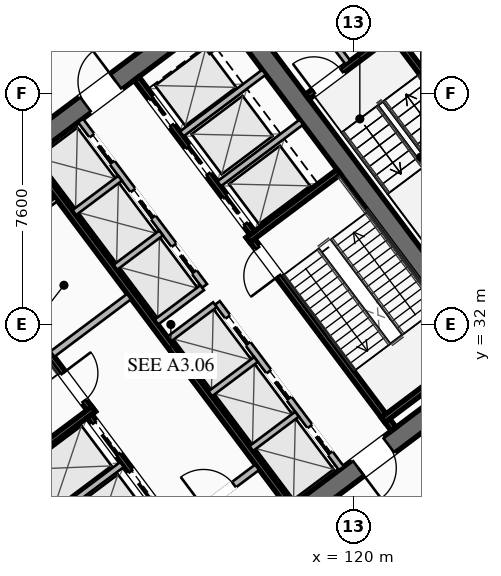
"""IFC4 building model, lengths in metres.
Left out: names, types, materials, properties, quantities, classifications, styles, units other than length and angle.
Written with IfcOpenShell. Run it as: python <this file> out.ifc"""

import sys

from ifc_helpers import new_model, si_unit, direction, frame, frame_2d, origin, place, context, subcontext, project, spatial, rectangle, extrude, element, fill, save


model = new_model("IFC4")
c1 = context("Model", 3, precision=1e-05, world=origin(), true_north=direction((0.0, 1.0)))
c2 = subcontext(c1, "Body", "Model", "MODEL_VIEW")
j1 = project(units=[si_unit("LENGTHUNIT", "METRE"), si_unit("PLANEANGLEUNIT", "RADIAN")], contexts=[c1])
p1 = place(None, origin())
s1 = spatial("IfcSite", under=j1, at=p1, CompositionType="ELEMENT")
p2 = place(p1, origin())
s2 = spatial("IfcBuilding", under=s1, at=p2, CompositionType="ELEMENT")
p3 = place(p2, origin())
s3 = spatial("IfcBuildingStorey", under=s2, at=p3, CompositionType="ELEMENT", Elevation=0.0)
for number, where, z_axis, x_axis in (
    (1, (112.476, 21.107, 0.0), (0.0, 0.0, 1.0), (-0.6, 0.8, 0.0)),
    (2, (115.524, 42.893, 0.0), (0.0, 0.0, 1.0), (0.6, -0.8, 0.0)),
):
    element("IfcWall", number, at=place(p3, frame(where, z_axis=z_axis, x_axis=x_axis)), inside=s3, PredefinedType="SHEAR", context=c2, shape_type="SweptSolid", body=[
        extrude(rectangle(XDim=15.6, YDim=0.65, at=frame_2d((7.8, 0.0))), origin(), (0.0, 0.0, 1.0), 5.4),
    ])
p4 = place(p3, frame((124.429, 30.478, 0.0), z_axis=(0.0, 0.0, 1.0), x_axis=(-0.799998028465, -0.600002628705, 0.0)))
e3 = element("IfcWall", 3, at=p4, inside=s3, PredefinedType="SHEAR", context=c2, shape_type="SweptSolid", body=[
    extrude(rectangle(XDim=14.86, YDim=0.65, at=frame_2d((7.43, 0.0))), origin(), (0.0, 0.0, 1.0), 5.4),
])
p5 = place(p4, frame((9.13, 0.0, 0.0)))
e4 = element("IfcOpeningElement", 4, at=p5, cuts=e3, PredefinedType="OPENING", context=c2, shape_type="SweptSolid", body=[
    extrude(rectangle(XDim=1.25, YDim=2.25, at=frame_2d((0.625, 1.125))), frame((0.0, 0.335, 0.0), z_axis=(0.0, -1.0, 0.0), x_axis=(1.0, 0.0, 0.0)), (0.0, 0.0, 1.0), 0.67),
])
p6 = place(p4, frame((4.08, 0.0, 0.0)))
e5 = element("IfcOpeningElement", 5, at=p6, cuts=e3, PredefinedType="OPENING", context=c2, shape_type="SweptSolid", body=[
    extrude(rectangle(XDim=1.25, YDim=2.25, at=frame_2d((0.625, 1.125))), frame((0.0, 0.335, 0.0), z_axis=(0.0, -1.0, 0.0), x_axis=(1.0, 0.0, 0.0)), (0.0, 0.0, 1.0), 0.67),
])
p7 = place(p3, frame((103.571, 33.522, 0.0), z_axis=(0.0, 0.0, 1.0), x_axis=(0.799998028465, 0.600002628705, 0.0)))
e6 = element("IfcWall", 6, at=p7, inside=s3, PredefinedType="SHEAR", context=c2, shape_type="SweptSolid", body=[
    extrude(rectangle(XDim=14.86, YDim=0.65, at=frame_2d((7.43, 0.0))), origin(), (0.0, 0.0, 1.0), 5.4),
])
p8 = place(p7, frame((4.48, 0.0, 0.0)))
e7 = element("IfcOpeningElement", 7, at=p8, cuts=e6, PredefinedType="OPENING", context=c2, shape_type="SweptSolid", body=[
    extrude(rectangle(XDim=1.25, YDim=2.25, at=frame_2d((0.625, 1.125))), frame((0.0, 0.335, 0.0), z_axis=(0.0, -1.0, 0.0), x_axis=(1.0, 0.0, 0.0)), (0.0, 0.0, 1.0), 0.67),
])
p9 = place(p7, frame((9.53, 0.0, 0.0)))
e8 = element("IfcOpeningElement", 8, at=p9, cuts=e6, PredefinedType="OPENING", context=c2, shape_type="SweptSolid", body=[
    extrude(rectangle(XDim=1.25, YDim=2.25, at=frame_2d((0.625, 1.125))), frame((0.0, 0.335, 0.0), z_axis=(0.0, -1.0, 0.0), x_axis=(1.0, 0.0, 0.0)), (0.0, 0.0, 1.0), 0.67),
])
p10 = place(p3, frame((106.67, 35.44, 0.0), z_axis=(0.0, 0.0, 1.0), x_axis=(0.600009827119, -0.799992629566, 0.0)))
e9 = element("IfcWall", 9, at=p10, inside=s3, PredefinedType="SHEAR", context=c2, shape_type="SweptSolid", body=[
    extrude(rectangle(XDim=7.95, YDim=0.2, at=frame_2d((3.975, 0.0))), origin(), (0.0, 0.0, 1.0), 5.14),
])
p11 = place(p10, frame((6.3, 0.0, 0.0)))
e10 = element("IfcOpeningElement", 10, at=p11, cuts=e9, PredefinedType="OPENING", context=c2, shape_type="SweptSolid", body=[
    extrude(rectangle(XDim=1.15, YDim=2.2, at=frame_2d((0.575, 1.1))), frame((0.0, 0.11, 0.0), z_axis=(0.0, -1.0, 0.0), x_axis=(1.0, 0.0, 0.0)), (0.0, 0.0, 1.0), 0.22),
])
p12 = place(p3, frame((108.476, 26.982, 0.0), z_axis=(0.0, 0.0, 1.0), x_axis=(0.799984290658, 0.600020945218, 0.0)))
e11 = element("IfcWall", 11, at=p12, inside=s3, PredefinedType="SHEAR", context=c2, shape_type="SweptSolid", body=[
    extrude(rectangle(XDim=3.73, YDim=0.2, at=frame_2d((1.865, 0.0))), origin(), (0.0, 0.0, 1.0), 5.14),
])
p13 = place(p3, frame((121.33, 28.56, 0.0), z_axis=(0.0, 0.0, 1.0), x_axis=(-0.600009827119, 0.799992629566, 0.0)))
e12 = element("IfcWall", 12, at=p13, inside=s3, PredefinedType="SHEAR", context=c2, shape_type="SweptSolid", body=[
    extrude(rectangle(XDim=7.95, YDim=0.2, at=frame_2d((3.975, 0.0))), origin(), (0.0, 0.0, 1.0), 5.14),
])
p14 = place(p13, frame((6.3, 0.0, 0.0)))
e13 = element("IfcOpeningElement", 13, at=p14, cuts=e12, PredefinedType="OPENING", context=c2, shape_type="SweptSolid", body=[
    extrude(rectangle(XDim=1.15, YDim=2.2, at=frame_2d((0.575, 1.1))), frame((0.0, 0.11, 0.0), z_axis=(0.0, -1.0, 0.0), x_axis=(1.0, 0.0, 0.0)), (0.0, 0.0, 1.0), 0.22),
])
for number, where, z_axis, x_axis in (
    (14, (116.54, 34.78, 0.0), (0.0, 0.0, 1.0), (0.8, 0.6, 0.0)),
    (15, (120.98, 28.86, 0.0), (0.0, 0.0, 1.0), (0.8, 0.6, 0.0)),
):
    element("IfcWall", number, at=place(p3, frame(where, z_axis=z_axis, x_axis=x_axis)), inside=s3, PredefinedType="SHEAR", context=c2, shape_type="SweptSolid", body=[
        extrude(rectangle(XDim=3.73, YDim=0.2, at=frame_2d((1.865, 0.0))), origin(), (0.0, 0.0, 1.0), 5.14),
    ])
p15 = place(p3, frame((117.938, 26.016, 0.0), z_axis=(0.0, 0.0, 1.0), x_axis=(-0.600005463273, 0.799995902516, 0.0)))
e16 = element("IfcWall", 16, at=p15, inside=s3, PredefinedType="SHEAR", context=c2, shape_type="SweptSolid", body=[
    extrude(rectangle(XDim=14.3, YDim=0.2, at=frame_2d((7.15, 0.0))), origin(), (0.0, 0.0, 1.0), 5.14),
])
p16 = place(p3, frame((110.104, 31.028, 0.0), z_axis=(0.0, 0.0, 1.0), x_axis=(0.800018601094, 0.59997519774, 0.0)))
e17 = element("IfcWall", 17, at=p16, inside=s3, PredefinedType="SOLIDWALL", context=c2, shape_type="SweptSolid", body=[
    extrude(rectangle(XDim=3.15, YDim=0.22, at=frame_2d((1.575, 0.0))), origin(), (0.0, 0.0, 1.0), 3.31),
])
p17 = place(p3, frame((114.316, 25.412, 0.0), z_axis=(0.0, 0.0, 1.0), x_axis=(0.800018601094, 0.59997519774, 0.0)))
e18 = element("IfcWall", 18, at=p17, inside=s3, PredefinedType="SOLIDWALL", context=c2, shape_type="SweptSolid", body=[
    extrude(rectangle(XDim=3.15, YDim=0.22, at=frame_2d((1.575, 0.0))), origin(), (0.0, 0.0, 1.0), 3.31),
])
p18 = place(p17, frame((0.95, 0.0, 0.0)))
e19 = element("IfcOpeningElement", 19, at=p18, cuts=e18, PredefinedType="OPENING", context=c2, shape_type="SweptSolid", body=[
    extrude(rectangle(XDim=1.25, YDim=2.25, at=frame_2d((0.625, 1.125))), frame((0.0, 0.12, 0.0), z_axis=(0.0, -1.0, 0.0), x_axis=(1.0, 0.0, 0.0)), (0.0, 0.0, 1.0), 0.24),
])
p19 = place(p3, frame((115.13, 23.91, 0.0), z_axis=(0.0, 0.0, 1.0), x_axis=(-0.599975393228, 0.800018454488, 0.0)))
e20 = element("IfcWall", 20, at=p19, inside=s3, PredefinedType="SHEAR", context=c2, shape_type="SweptSolid", body=[
    extrude(rectangle(XDim=6.35, YDim=0.2, at=frame_2d((3.175, 0.0))), origin(), (0.0, 0.0, 1.0), 5.14),
])
p20 = place(p19, frame((4.775, 0.0, 0.0)))
e21 = element("IfcOpeningElement", 21, at=p20, cuts=e20, PredefinedType="OPENING", context=c2, shape_type="SweptSolid", body=[
    extrude(rectangle(XDim=1.3, YDim=2.25, at=frame_2d((0.65, 1.125))), frame((0.0, 0.11, 0.0), z_axis=(0.0, -1.0, 0.0), x_axis=(1.0, 0.0, 0.0)), (0.0, 0.0, 1.0), 0.22),
])
p21 = place(p19, frame((2.775, 0.0, 0.0)))
e22 = element("IfcOpeningElement", 22, at=p21, cuts=e20, PredefinedType="OPENING", context=c2, shape_type="SweptSolid", body=[
    extrude(rectangle(XDim=1.3, YDim=2.25, at=frame_2d((0.65, 1.125))), frame((0.0, 0.11, 0.0), z_axis=(0.0, -1.0, 0.0), x_axis=(1.0, 0.0, 0.0)), (0.0, 0.0, 1.0), 0.22),
])
p22 = place(p19, frame((0.575, 0.0, 0.0)))
e23 = element("IfcOpeningElement", 23, at=p22, cuts=e20, PredefinedType="OPENING", context=c2, shape_type="SweptSolid", body=[
    extrude(rectangle(XDim=1.3, YDim=2.25, at=frame_2d((0.65, 1.125))), frame((0.0, 0.11, 0.0), z_axis=(0.0, -1.0, 0.0), x_axis=(1.0, 0.0, 0.0)), (0.0, 0.0, 1.0), 0.22),
])
p23 = place(p3, frame((109.688, 25.366, 0.0), z_axis=(0.0, 0.0, 1.0), x_axis=(0.8, 0.6, 0.0)))
e24 = element("IfcWall", 24, at=p23, inside=s3, PredefinedType="SOLIDWALL", context=c2, shape_type="SweptSolid", body=[
    extrude(rectangle(XDim=3.38, YDim=0.2, at=frame_2d((1.69, 0.0))), origin(), (0.0, 0.0, 1.0), 5.14),
])
p24 = place(p3, frame((112.87, 40.09, 0.0), z_axis=(0.0, 0.0, 1.0), x_axis=(0.599975393228, -0.800018454488, 0.0)))
e25 = element("IfcWall", 25, at=p24, inside=s3, PredefinedType="SHEAR", context=c2, shape_type="SweptSolid", body=[
    extrude(rectangle(XDim=6.35, YDim=0.2, at=frame_2d((3.175, 0.0))), origin(), (0.0, 0.0, 1.0), 5.14),
])
p25 = place(p24, frame((4.875, 0.0, 0.0)))
e26 = element("IfcOpeningElement", 26, at=p25, cuts=e25, PredefinedType="OPENING", context=c2, shape_type="SweptSolid", body=[
    extrude(rectangle(XDim=1.1, YDim=2.2, at=frame_2d((0.55, 1.1))), frame((0.0, 0.11, 0.0), z_axis=(0.0, -1.0, 0.0), x_axis=(1.0, 0.0, 0.0)), (0.0, 0.0, 1.0), 0.22),
])
p26 = place(p24, frame((2.825, 0.0, 0.0)))
e27 = element("IfcOpeningElement", 27, at=p26, cuts=e25, PredefinedType="OPENING", context=c2, shape_type="SweptSolid", body=[
    extrude(rectangle(XDim=1.1, YDim=2.2, at=frame_2d((0.55, 1.1))), frame((0.0, 0.11, 0.0), z_axis=(0.0, -1.0, 0.0), x_axis=(1.0, 0.0, 0.0)), (0.0, 0.0, 1.0), 0.22),
])
p27 = place(p24, frame((0.825, 0.0, 0.0)))
e28 = element("IfcOpeningElement", 28, at=p27, cuts=e25, PredefinedType="OPENING", context=c2, shape_type="SweptSolid", body=[
    extrude(rectangle(XDim=1.1, YDim=2.2, at=frame_2d((0.55, 1.1))), frame((0.0, 0.11, 0.0), z_axis=(0.0, -1.0, 0.0), x_axis=(1.0, 0.0, 0.0)), (0.0, 0.0, 1.0), 0.22),
])
for number, where, z_axis, x_axis in (
    (29, (115.59, 36.63, 0.0), (0.0, 0.0, 1.0), (0.8, 0.6, 0.0)),
    (30, (114.36, 38.27, 0.0), (0.0, 0.0, 1.0), (0.8, 0.6, 0.0)),
):
    element("IfcWall", number, at=place(p3, frame(where, z_axis=z_axis, x_axis=x_axis)), inside=s3, PredefinedType="SOLIDWALL", context=c2, shape_type="SweptSolid", body=[
        extrude(rectangle(XDim=3.38, YDim=0.2, at=frame_2d((1.69, 0.0))), origin(), (0.0, 0.0, 1.0), 5.14),
    ])
p28 = place(p3, frame((107.71, 34.22, 0.0), z_axis=(0.0, 0.0, 1.0), x_axis=(0.799981399002, 0.60002480053, 0.0)))
e31 = element("IfcWall", 31, at=p28, inside=s3, PredefinedType="PARTITIONING", context=c2, shape_type="SweptSolid", body=[
    extrude(rectangle(XDim=3.15, YDim=0.135, at=frame_2d((1.575, 0.0))), origin(), (0.0, 0.0, 1.0), 3.31),
])
p29 = place(p28, frame((1.05, 0.0, 0.0)))
e32 = element("IfcOpeningElement", 32, at=p29, cuts=e31, PredefinedType="OPENING", context=c2, shape_type="SweptSolid", body=[
    extrude(rectangle(XDim=1.05, YDim=2.2, at=frame_2d((0.525, 1.1))), frame((0.0, 0.077, 0.0), z_axis=(0.0, -1.0, 0.0), x_axis=(1.0, 0.0, 0.0)), (0.0, 0.0, 1.0), 0.155),
])
p30 = place(p3, frame((119.61, 27.27, 0.0), z_axis=(0.0, 0.0, 1.0), x_axis=(-0.600011488909, 0.79999138319, 0.0)))
e33 = element("IfcWall", 33, at=p30, inside=s3, PredefinedType="SOLIDWALL", context=c2, shape_type="SweptSolid", body=[
    extrude(rectangle(XDim=6.8, YDim=0.2, at=frame_2d((3.4, 0.0))), origin(), (0.0, 0.0, 1.0), 5.14),
])
p31 = place(p30, frame((0.625, 0.0, 0.0)))
e34 = element("IfcOpeningElement", 34, at=p31, cuts=e33, PredefinedType="OPENING", context=c2, shape_type="SweptSolid", body=[
    extrude(rectangle(XDim=1.1, YDim=2.2, at=frame_2d((0.55, 1.1))), frame((0.0, 0.11, 0.0), z_axis=(0.0, -1.0, 0.0), x_axis=(1.0, 0.0, 0.0)), (0.0, 0.0, 1.0), 0.22),
])
p32 = place(p30, frame((2.875, 0.0, 0.0)))
e35 = element("IfcOpeningElement", 35, at=p32, cuts=e33, PredefinedType="OPENING", context=c2, shape_type="SweptSolid", body=[
    extrude(rectangle(XDim=1.1, YDim=2.2, at=frame_2d((0.55, 1.1))), frame((0.0, 0.11, 0.0), z_axis=(0.0, -1.0, 0.0), x_axis=(1.0, 0.0, 0.0)), (0.0, 0.0, 1.0), 0.22),
])
p33 = place(p30, frame((5.125, 0.0, 0.0)))
e36 = element("IfcOpeningElement", 36, at=p33, cuts=e33, PredefinedType="OPENING", context=c2, shape_type="SweptSolid", body=[
    extrude(rectangle(XDim=1.1, YDim=2.2, at=frame_2d((0.55, 1.1))), frame((0.0, 0.11, 0.0), z_axis=(0.0, -1.0, 0.0), x_axis=(1.0, 0.0, 0.0)), (0.0, 0.0, 1.0), 0.22),
])
p34 = place(p3, frame((116.646, 27.922, 0.0), z_axis=(0.0, 0.0, 1.0), x_axis=(0.8, 0.6, 0.0)))
e37 = element("IfcWall", 37, at=p34, inside=s3, PredefinedType="SOLIDWALL", context=c2, shape_type="SweptSolid", body=[
    extrude(rectangle(XDim=1.88, YDim=0.2, at=frame_2d((0.94, 0.0))), origin(), (0.0, 0.0, 1.0), 5.14),
])
p35 = place(p3, frame((115.296, 29.722, 0.0), z_axis=(0.0, 0.0, 1.0), x_axis=(0.799984418148, 0.600020775241, 0.0)))
e38 = element("IfcWall", 38, at=p35, inside=s3, PredefinedType="SOLIDWALL", context=c2, shape_type="SweptSolid", body=[
    extrude(rectangle(XDim=1.88, YDim=0.2, at=frame_2d((0.94, 0.0))), origin(), (0.0, 0.0, 1.0), 5.14),
])
p36 = place(p3, frame((113.946, 31.522, 0.0), z_axis=(0.0, 0.0, 1.0), x_axis=(0.8, 0.6, 0.0)))
e39 = element("IfcWall", 39, at=p36, inside=s3, PredefinedType="SOLIDWALL", context=c2, shape_type="SweptSolid", body=[
    extrude(rectangle(XDim=1.88, YDim=0.2, at=frame_2d((0.94, 0.0))), origin(), (0.0, 0.0, 1.0), 5.14),
])
p37 = place(p3, frame((115.11, 33.27, 0.0), z_axis=(0.0, 0.0, 1.0), x_axis=(-0.600011488909, 0.79999138319, 0.0)))
e40 = element("IfcWall", 40, at=p37, inside=s3, PredefinedType="SOLIDWALL", context=c2, shape_type="SweptSolid", body=[
    extrude(rectangle(XDim=6.8, YDim=0.2, at=frame_2d((3.4, 0.0))), origin(), (0.0, 0.0, 1.0), 5.14),
])
p38 = place(p37, frame((0.575, 0.0, 0.0)))
e41 = element("IfcOpeningElement", 41, at=p38, cuts=e40, PredefinedType="OPENING", context=c2, shape_type="SweptSolid", body=[
    extrude(rectangle(XDim=1.1, YDim=2.2, at=frame_2d((0.55, 1.1))), frame((0.0, 0.11, 0.0), z_axis=(0.0, -1.0, 0.0), x_axis=(1.0, 0.0, 0.0)), (0.0, 0.0, 1.0), 0.22),
])
p39 = place(p37, frame((2.825, 0.0, 0.0)))
e42 = element("IfcOpeningElement", 42, at=p39, cuts=e40, PredefinedType="OPENING", context=c2, shape_type="SweptSolid", body=[
    extrude(rectangle(XDim=1.1, YDim=2.2, at=frame_2d((0.55, 1.1))), frame((0.0, 0.11, 0.0), z_axis=(0.0, -1.0, 0.0), x_axis=(1.0, 0.0, 0.0)), (0.0, 0.0, 1.0), 0.22),
])
p40 = place(p37, frame((5.075, 0.0, 0.0)))
e43 = element("IfcOpeningElement", 43, at=p40, cuts=e40, PredefinedType="OPENING", context=c2, shape_type="SweptSolid", body=[
    extrude(rectangle(XDim=1.1, YDim=2.2, at=frame_2d((0.55, 1.1))), frame((0.0, 0.11, 0.0), z_axis=(0.0, -1.0, 0.0), x_axis=(1.0, 0.0, 0.0)), (0.0, 0.0, 1.0), 0.22),
])
p41 = place(p3, frame((113.526, 32.082, 0.0), z_axis=(0.0, 0.0, 1.0), x_axis=(0.800046745961, 0.599937666993, 0.0)))
e44 = element("IfcWall", 44, at=p41, inside=s3, PredefinedType="SOLIDWALL", context=c2, shape_type="SweptSolid", body=[
    extrude(rectangle(XDim=1.88, YDim=0.2, at=frame_2d((0.94, 0.0))), origin(), (0.0, 0.0, 1.0), 5.14),
])
p42 = place(p3, frame((112.176, 33.882, 0.0), z_axis=(0.0, 0.0, 1.0), x_axis=(0.8, 0.6, 0.0)))
e45 = element("IfcWall", 45, at=p42, inside=s3, PredefinedType="SOLIDWALL", context=c2, shape_type="SweptSolid", body=[
    extrude(rectangle(XDim=1.88, YDim=0.2, at=frame_2d((0.94, 0.0))), origin(), (0.0, 0.0, 1.0), 5.14),
])
p43 = place(p3, frame((110.826, 35.682, 0.0), z_axis=(0.0, 0.0, 1.0), x_axis=(0.799984418148, 0.600020775241, 0.0)))
e46 = element("IfcWall", 46, at=p43, inside=s3, PredefinedType="SOLIDWALL", context=c2, shape_type="SweptSolid", body=[
    extrude(rectangle(XDim=1.88, YDim=0.2, at=frame_2d((0.94, 0.0))), origin(), (0.0, 0.0, 1.0), 5.14),
])
p44 = place(p3, frame((125.304, 36.228, 0.0), z_axis=(0.0, 0.0, 1.0), x_axis=(-0.59998851072, 0.800008616831, 0.0)))
e47 = element("IfcWall", 47, at=p44, inside=s3, PredefinedType="SHEAR", context=c2, shape_type="SweptSolid", body=[
    extrude(rectangle(XDim=6.8, YDim=0.2, at=frame_2d((3.4, 0.0))), origin(), (0.0, 0.0, 1.0), 5.14),
])
p45 = place(p3, frame((118.484, 39.488, 0.0), z_axis=(0.0, 0.0, 1.0), x_axis=(0.800017232136, 0.599977023131, 0.0)))
e48 = element("IfcWall", 48, at=p45, inside=s3, PredefinedType="SHEAR", context=c2, shape_type="SweptSolid", body=[
    extrude(rectangle(XDim=3.4, YDim=0.2, at=frame_2d((1.7, 0.0))), origin(), (0.0, 0.0, 1.0), 5.14),
])
p46 = place(p45, frame((0.275, 0.0, 0.0)))
e49 = element("IfcOpeningElement", 49, at=p46, cuts=e48, PredefinedType="OPENING", context=c2, shape_type="SweptSolid", body=[
    extrude(rectangle(XDim=1.15, YDim=2.2, at=frame_2d((0.575, 1.1))), frame((0.0, 0.11, 0.0), z_axis=(0.0, -1.0, 0.0), x_axis=(1.0, 0.0, 0.0)), (0.0, 0.0, 1.0), 0.22),
])
p47 = place(p3, frame((117.112, 44.234, 0.0), z_axis=(0.0, 0.0, 1.0), x_axis=(0.59999135767, -0.800006481675, 0.0)))
e50 = element("IfcWall", 50, at=p47, inside=s3, PredefinedType="SOLIDWALL", context=c2, shape_type="SweptSolid", body=[
    extrude(rectangle(XDim=4.52, YDim=0.2, at=frame_2d((2.26, 0.0))), origin(), (0.0, 0.0, 1.0), 3.31),
])
p48 = place(p47, frame((1.2, 0.0, 0.0)))
e51 = element("IfcOpeningElement", 51, at=p48, cuts=e50, PredefinedType="OPENING", context=c2, shape_type="SweptSolid", body=[
    extrude(rectangle(XDim=1.15, YDim=2.2, at=frame_2d((0.575, 1.1))), frame((0.0, 0.11, 0.0), z_axis=(0.0, -1.0, 0.0), x_axis=(1.0, 0.0, 0.0)), (0.0, 0.0, 1.0), 0.22),
])
p49 = place(p9, origin())
e52 = element("IfcDoor", 52, at=p49, inside=s3, OperationType="SINGLE_SWING_RIGHT", PredefinedType="DOOR", context=c2, shape_type="SweptSolid", body=[
    extrude(rectangle(XDim=1.25, YDim=2.25, at=frame_2d((0.625, 1.125))), frame((0.0, 0.025, 0.0), z_axis=(0.0, -1.0, 0.0), x_axis=(1.0, 0.0, 0.0)), (0.0, 0.0, 1.0), 0.05),
])
fill(e8, e52)
p50 = place(p6, origin())
e53 = element("IfcDoor", 53, at=p50, inside=s3, OperationType="SINGLE_SWING_RIGHT", PredefinedType="DOOR", context=c2, shape_type="SweptSolid", body=[
    extrude(rectangle(XDim=1.25, YDim=2.25, at=frame_2d((0.625, 1.125))), frame((0.0, 0.025, 0.0), z_axis=(0.0, -1.0, 0.0), x_axis=(1.0, 0.0, 0.0)), (0.0, 0.0, 1.0), 0.05),
])
fill(e5, e53)
p51 = place(p11, origin())
e54 = element("IfcDoor", 54, at=p51, inside=s3, OperationType="SINGLE_SWING_LEFT", PredefinedType="DOOR", context=c2, shape_type="SweptSolid", body=[
    extrude(rectangle(XDim=1.15, YDim=2.2, at=frame_2d((0.575, 1.1))), frame((0.0, 0.025, 0.0), z_axis=(0.0, -1.0, 0.0), x_axis=(1.0, 0.0, 0.0)), (0.0, 0.0, 1.0), 0.05),
])
fill(e10, e54)
p52 = place(p14, origin())
e55 = element("IfcDoor", 55, at=p52, inside=s3, OperationType="SINGLE_SWING_LEFT", PredefinedType="DOOR", context=c2, shape_type="SweptSolid", body=[
    extrude(rectangle(XDim=1.15, YDim=2.2, at=frame_2d((0.575, 1.1))), frame((0.0, 0.025, 0.0), z_axis=(0.0, -1.0, 0.0), x_axis=(1.0, 0.0, 0.0)), (0.0, 0.0, 1.0), 0.05),
])
fill(e13, e55)
p53 = place(p18, origin())
e56 = element("IfcDoor", 56, at=p53, inside=s3, OperationType="SINGLE_SWING_LEFT", PredefinedType="DOOR", context=c2, shape_type="SweptSolid", body=[
    extrude(rectangle(XDim=1.25, YDim=2.25, at=frame_2d((0.625, 1.125))), frame((0.0, 0.025, 0.0), z_axis=(0.0, -1.0, 0.0), x_axis=(1.0, 0.0, 0.0)), (0.0, 0.0, 1.0), 0.05),
])
fill(e19, e56)
p54 = place(p46, origin())
e57 = element("IfcDoor", 57, at=p54, inside=s3, OperationType="SINGLE_SWING_LEFT", PredefinedType="DOOR", context=c2, shape_type="SweptSolid", body=[
    extrude(rectangle(XDim=1.15, YDim=2.2, at=frame_2d((0.575, 1.1))), frame((0.0, 0.025, 0.0), z_axis=(0.0, -1.0, 0.0), x_axis=(1.0, 0.0, 0.0)), (0.0, 0.0, 1.0), 0.05),
])
fill(e49, e57)
p55 = place(p20, origin())
e58 = element("IfcDoor", 58, at=p55, inside=s3, OperationType="SLIDING_TO_LEFT", PredefinedType="DOOR", context=c2, shape_type="SweptSolid", body=[
    extrude(rectangle(XDim=1.3, YDim=2.25, at=frame_2d((0.65, 1.125))), frame((0.0, 0.025, 0.0), z_axis=(0.0, -1.0, 0.0), x_axis=(1.0, 0.0, 0.0)), (0.0, 0.0, 1.0), 0.05),
])
fill(e21, e58)
p56 = place(p21, origin())
e59 = element("IfcDoor", 59, at=p56, inside=s3, OperationType="SLIDING_TO_LEFT", PredefinedType="DOOR", context=c2, shape_type="SweptSolid", body=[
    extrude(rectangle(XDim=1.3, YDim=2.25, at=frame_2d((0.65, 1.125))), frame((0.0, 0.025, 0.0), z_axis=(0.0, -1.0, 0.0), x_axis=(1.0, 0.0, 0.0)), (0.0, 0.0, 1.0), 0.05),
])
fill(e22, e59)
p57 = place(p31, origin())
e60 = element("IfcDoor", 60, at=p57, inside=s3, OperationType="SLIDING_TO_LEFT", PredefinedType="DOOR", context=c2, shape_type="SweptSolid", body=[
    extrude(rectangle(XDim=1.1, YDim=2.2, at=frame_2d((0.55, 1.1))), frame((0.0, 0.025, 0.0), z_axis=(0.0, -1.0, 0.0), x_axis=(1.0, 0.0, 0.0)), (0.0, 0.0, 1.0), 0.05),
])
fill(e34, e60)
p58 = place(p32, origin())
e61 = element("IfcDoor", 61, at=p58, inside=s3, OperationType="SLIDING_TO_LEFT", PredefinedType="DOOR", context=c2, shape_type="SweptSolid", body=[
    extrude(rectangle(XDim=1.1, YDim=2.2, at=frame_2d((0.55, 1.1))), frame((0.0, 0.025, 0.0), z_axis=(0.0, -1.0, 0.0), x_axis=(1.0, 0.0, 0.0)), (0.0, 0.0, 1.0), 0.05),
])
fill(e35, e61)
p59 = place(p33, origin())
e62 = element("IfcDoor", 62, at=p59, inside=s3, OperationType="SLIDING_TO_LEFT", PredefinedType="DOOR", context=c2, shape_type="SweptSolid", body=[
    extrude(rectangle(XDim=1.1, YDim=2.2, at=frame_2d((0.55, 1.1))), frame((0.0, 0.025, 0.0), z_axis=(0.0, -1.0, 0.0), x_axis=(1.0, 0.0, 0.0)), (0.0, 0.0, 1.0), 0.05),
])
fill(e36, e62)
p60 = place(p38, origin())
e63 = element("IfcDoor", 63, at=p60, inside=s3, OperationType="SLIDING_TO_LEFT", PredefinedType="DOOR", context=c2, shape_type="SweptSolid", body=[
    extrude(rectangle(XDim=1.1, YDim=2.2, at=frame_2d((0.55, 1.1))), frame((0.0, 0.025, 0.0), z_axis=(0.0, -1.0, 0.0), x_axis=(1.0, 0.0, 0.0)), (0.0, 0.0, 1.0), 0.05),
])
fill(e41, e63)
p61 = place(p39, origin())
e64 = element("IfcDoor", 64, at=p61, inside=s3, OperationType="SLIDING_TO_LEFT", PredefinedType="DOOR", context=c2, shape_type="SweptSolid", body=[
    extrude(rectangle(XDim=1.1, YDim=2.2, at=frame_2d((0.55, 1.1))), frame((0.0, 0.025, 0.0), z_axis=(0.0, -1.0, 0.0), x_axis=(1.0, 0.0, 0.0)), (0.0, 0.0, 1.0), 0.05),
])
fill(e42, e64)
p62 = place(p40, origin())
e65 = element("IfcDoor", 65, at=p62, inside=s3, OperationType="SLIDING_TO_LEFT", PredefinedType="DOOR", context=c2, shape_type="SweptSolid", body=[
    extrude(rectangle(XDim=1.1, YDim=2.2, at=frame_2d((0.55, 1.1))), frame((0.0, 0.025, 0.0), z_axis=(0.0, -1.0, 0.0), x_axis=(1.0, 0.0, 0.0)), (0.0, 0.0, 1.0), 0.05),
])
fill(e43, e65)
p63 = place(p25, origin())
e66 = element("IfcDoor", 66, at=p63, inside=s3, OperationType="SLIDING_TO_LEFT", PredefinedType="DOOR", context=c2, shape_type="SweptSolid", body=[
    extrude(rectangle(XDim=1.1, YDim=2.2, at=frame_2d((0.55, 1.1))), frame((0.0, 0.025, 0.0), z_axis=(0.0, -1.0, 0.0), x_axis=(1.0, 0.0, 0.0)), (0.0, 0.0, 1.0), 0.05),
])
fill(e26, e66)
p64 = place(p26, origin())
e67 = element("IfcDoor", 67, at=p64, inside=s3, OperationType="SLIDING_TO_LEFT", PredefinedType="DOOR", context=c2, shape_type="SweptSolid", body=[
    extrude(rectangle(XDim=1.1, YDim=2.2, at=frame_2d((0.55, 1.1))), frame((0.0, 0.025, 0.0), z_axis=(0.0, -1.0, 0.0), x_axis=(1.0, 0.0, 0.0)), (0.0, 0.0, 1.0), 0.05),
])
fill(e27, e67)
p65 = place(p27, origin())
e68 = element("IfcDoor", 68, at=p65, inside=s3, OperationType="SLIDING_TO_LEFT", PredefinedType="DOOR", context=c2, shape_type="SweptSolid", body=[
    extrude(rectangle(XDim=1.1, YDim=2.2, at=frame_2d((0.55, 1.1))), frame((0.0, 0.025, 0.0), z_axis=(0.0, -1.0, 0.0), x_axis=(1.0, 0.0, 0.0)), (0.0, 0.0, 1.0), 0.05),
])
fill(e28, e68)
save(model, sys.argv[1])
